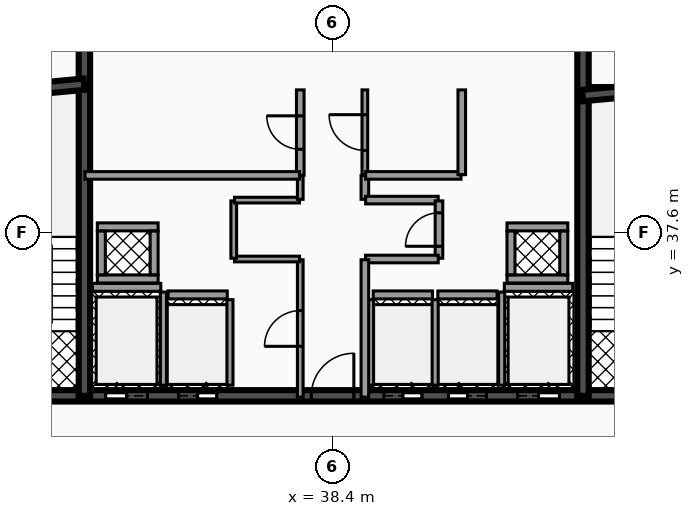
"""IFC4 building model, lengths in metres.
Left out: names, types, materials, properties, quantities, classifications, styles, units other than length and angle.
Written with IfcOpenShell. Run it as: python <this file> out.ifc"""

import sys

from ifc_helpers import new_model, si_unit, direction, frame, frame_2d, origin, place, context, subcontext, project, spatial, rectangle, extrude, element, fill, save


model = new_model("IFC4")
c1 = context("Model", 3, precision=1e-05, world=origin(), true_north=direction((0.0, 1.0)))
c2 = subcontext(c1, "Body", "Model", "MODEL_VIEW")
j1 = project(units=[si_unit("LENGTHUNIT", "METRE"), si_unit("PLANEANGLEUNIT", "RADIAN")], contexts=[c1])
p1 = place(None, origin())
s1 = spatial("IfcSite", under=j1, at=p1, CompositionType="ELEMENT")
p2 = place(p1, origin())
s2 = spatial("IfcBuilding", under=s1, at=p2, CompositionType="ELEMENT")
p3 = place(p2, frame((0.0, 0.0, 261.8)))
s3 = spatial("IfcBuildingStorey", under=s2, at=p3, CompositionType="ELEMENT", Elevation=261.8)
p4 = place(p3, frame((28.5, 33.3, 0.0), z_axis=(0.0, 0.0, 1.0), x_axis=(1.0, 0.0, 0.0)))
e1 = element("IfcWall", 1, at=p4, inside=s3, PredefinedType="SHEAR", context=c2, shape_type="SweptSolid", body=[
    extrude(rectangle(XDim=19.86, YDim=0.3, at=frame_2d((9.93, 0.0))), origin(), (0.0, 0.0, 1.0), 3.18),
])
p5 = place(p4, frame((3.93, 0.0, 0.0)))
e2 = element("IfcOpeningElement", 2, at=p5, cuts=e1, PredefinedType="OPENING", context=c2, shape_type="SweptSolid", body=[
    extrude(rectangle(XDim=1.1, YDim=2.15, at=frame_2d((0.55, 1.075))), frame((0.0, 0.16, 0.0), z_axis=(0.0, -1.0, 0.0), x_axis=(1.0, 0.0, 0.0)), (0.0, 0.0, 1.0), 0.32),
])
p6 = place(p4, frame((14.77, 0.0, 0.0)))
e3 = element("IfcOpeningElement", 3, at=p6, cuts=e1, PredefinedType="OPENING", context=c2, shape_type="SweptSolid", body=[
    extrude(rectangle(XDim=1.1, YDim=2.15, at=frame_2d((0.55, 1.075))), frame((0.0, 0.16, 0.0), z_axis=(0.0, -1.0, 0.0), x_axis=(1.0, 0.0, 0.0)), (0.0, 0.0, 1.0), 0.32),
])
p7 = place(p4, frame((11.25, 0.0, 0.0)))
e4 = element("IfcOpeningElement", 4, at=p7, cuts=e1, PredefinedType="OPENING", context=c2, shape_type="SweptSolid", body=[
    extrude(rectangle(XDim=1.0, YDim=2.1, at=frame_2d((0.5, 1.05))), frame((0.0, 0.16, 0.0), z_axis=(0.0, -1.0, 0.0), x_axis=(1.0, 0.0, 0.0)), (0.0, 0.0, 1.0), 0.32),
])
p8 = place(p4, frame((12.95, 0.0, 0.0)))
e5 = element("IfcOpeningElement", 5, at=p8, cuts=e1, PredefinedType="OPENING", context=c2, shape_type="SweptSolid", body=[
    extrude(rectangle(XDim=1.0, YDim=2.1, at=frame_2d((0.5, 1.05))), frame((0.0, 0.16, 0.0), z_axis=(0.0, -1.0, 0.0), x_axis=(1.0, 0.0, 0.0)), (0.0, 0.0, 1.0), 0.32),
])
p9 = place(p4, frame((5.85, 0.0, 0.0)))
e6 = element("IfcOpeningElement", 6, at=p9, cuts=e1, PredefinedType="OPENING", context=c2, shape_type="SweptSolid", body=[
    extrude(rectangle(XDim=1.0, YDim=2.1, at=frame_2d((0.5, 1.05))), frame((0.0, 0.16, 0.0), z_axis=(0.0, -1.0, 0.0), x_axis=(1.0, 0.0, 0.0)), (0.0, 0.0, 1.0), 0.32),
])
p10 = place(p4, frame((1.21, 0.0, 0.0)))
e7 = element("IfcOpeningElement", 7, at=p10, cuts=e1, PredefinedType="OPENING", context=c2, shape_type="SweptSolid", body=[
    extrude(rectangle(XDim=1.1, YDim=2.2, at=frame_2d((0.55, 1.1))), frame((0.0, 0.16, 0.0), z_axis=(0.0, -1.0, 0.0), x_axis=(1.0, 0.0, 0.0)), (0.0, 0.0, 1.0), 0.32),
])
p11 = place(p4, frame((9.34, 0.0, 0.0)))
e8 = element("IfcOpeningElement", 8, at=p11, cuts=e1, PredefinedType="OPENING", context=c2, shape_type="SweptSolid", body=[
    extrude(rectangle(XDim=1.12, YDim=2.05, at=frame_2d((0.56, 1.025))), frame((0.0, 0.16, 0.0), z_axis=(0.0, -1.0, 0.0), x_axis=(1.0, 0.0, 0.0)), (0.0, 0.0, 1.0), 0.32),
])
p12 = place(p4, frame((17.55, 0.0, 0.0)))
e9 = element("IfcOpeningElement", 9, at=p12, cuts=e1, PredefinedType="OPENING", context=c2, shape_type="SweptSolid", body=[
    extrude(rectangle(XDim=1.1, YDim=2.2, at=frame_2d((0.55, 1.1))), frame((0.0, 0.16, 0.0), z_axis=(0.0, -1.0, 0.0), x_axis=(1.0, 0.0, 0.0)), (0.0, 0.0, 1.0), 0.32),
])
for number, where, z_axis, x_axis in (
    (10, (31.87, 33.3, 0.0), (0.0, 0.0, 1.0), (0.0, 1.0, 0.0)),
    (11, (44.99, 33.3, 0.0), (0.0, 0.0, 1.0), (0.0, 1.0, 0.0)),
):
    element("IfcWall", number, at=place(p3, frame(where, z_axis=z_axis, x_axis=x_axis)), inside=s3, PredefinedType="SHEAR", context=c2, shape_type="SweptSolid", body=[
        extrude(rectangle(XDim=10.1, YDim=0.3, at=frame_2d((5.05, 0.0))), origin(), (0.0, 0.0, 1.0), 3.18),
    ])
p13 = place(p3, frame((28.64, 41.2, 0.0), z_axis=(0.0, 0.0, 1.0), x_axis=(0.995687118776, 0.092774789157, 0.0)))
e12 = element("IfcWall", 12, at=p13, inside=s3, PredefinedType="SHEAR", context=c2, shape_type="SweptSolid", body=[
    extrude(rectangle(XDim=3.234, YDim=0.3, at=frame_2d((1.617, 0.0))), origin(), (0.0, 0.0, 1.0), 3.18),
])
p14 = place(p3, frame((44.98, 41.2, 0.0), z_axis=(0.0, 0.0, 1.0), x_axis=(0.995686468965, 0.09278176286, 0.0)))
e13 = element("IfcWall", 13, at=p14, inside=s3, PredefinedType="SHEAR", context=c2, shape_type="SweptSolid", body=[
    extrude(rectangle(XDim=3.234, YDim=0.3, at=frame_2d((1.617, 0.0))), origin(), (0.0, 0.0, 1.0), 3.18),
])
p15 = place(p3, frame((32.08, 36.155, 0.0), z_axis=(0.0, 0.0, 1.0), x_axis=(1.0, 0.0, 0.0)))
e14 = element("IfcWall", 14, at=p15, inside=s3, PredefinedType="SOLIDWALL", context=c2, shape_type="SweptSolid", body=[
    extrude(rectangle(XDim=1.8, YDim=0.21, at=frame_2d((0.9, 0.0))), origin(), (0.0, 0.0, 1.0), 3.18),
])
p16 = place(p3, frame((33.95, 33.58, 0.0), z_axis=(0.0, 0.0, 1.0), x_axis=(0.0, 1.0, 0.0)))
e15 = element("IfcWall", 15, at=p16, inside=s3, PredefinedType="SOLIDWALL", context=c2, shape_type="SweptSolid", body=[
    extrude(rectangle(XDim=2.45, YDim=0.16, at=frame_2d((1.225, 0.0))), origin(), (0.0, 0.0, 1.0), 3.18),
])
p17 = place(p3, frame((42.92, 36.155, 0.0), z_axis=(0.0, 0.0, 1.0), x_axis=(1.0, 0.0, 0.0)))
e16 = element("IfcWall", 16, at=p17, inside=s3, PredefinedType="SOLIDWALL", context=c2, shape_type="SweptSolid", body=[
    extrude(rectangle(XDim=1.8, YDim=0.21, at=frame_2d((0.9, 0.0))), origin(), (0.0, 0.0, 1.0), 3.18),
])
p18 = place(p3, frame((42.85, 33.58, 0.0), z_axis=(0.0, 0.0, 1.0), x_axis=(0.0, 1.0, 0.0)))
e17 = element("IfcWall", 17, at=p18, inside=s3, PredefinedType="SOLIDWALL", context=c2, shape_type="SweptSolid", body=[
    extrude(rectangle(XDim=2.45, YDim=0.16, at=frame_2d((1.225, 0.0))), origin(), (0.0, 0.0, 1.0), 3.18),
])
p19 = place(p3, frame((39.47, 35.955, 0.0), z_axis=(0.0, 0.0, 1.0), x_axis=(1.0, 0.0, 0.0)))
e18 = element("IfcWall", 18, at=p19, inside=s3, PredefinedType="SOLIDWALL", context=c2, shape_type="SweptSolid", body=[
    extrude(rectangle(XDim=1.56, YDim=0.21, at=frame_2d((0.78, 0.0))), origin(), (0.0, 0.0, 1.0), 3.18),
])
for number, where, z_axis, x_axis in (
    (19, (39.4, 33.58, 0.0), (0.0, 0.0, 1.0), (0.0, 1.0, 0.0)),
    (20, (41.1, 33.58, 0.0), (0.0, 0.0, 1.0), (0.0, 1.0, 0.0)),
):
    element("IfcWall", number, at=place(p3, frame(where, z_axis=z_axis, x_axis=x_axis)), inside=s3, PredefinedType="SOLIDWALL", context=c2, shape_type="SweptSolid", body=[
        extrude(rectangle(XDim=2.25, YDim=0.16, at=frame_2d((1.125, 0.0))), origin(), (0.0, 0.0, 1.0), 3.18),
    ])
p20 = place(p3, frame((41.17, 35.955, 0.0), z_axis=(0.0, 0.0, 1.0), x_axis=(1.0, 0.0, 0.0)))
e21 = element("IfcWall", 21, at=p20, inside=s3, PredefinedType="SOLIDWALL", context=c2, shape_type="SweptSolid", body=[
    extrude(rectangle(XDim=1.56, YDim=0.21, at=frame_2d((0.78, 0.0))), origin(), (0.0, 0.0, 1.0), 3.18),
])
p21 = place(p3, frame((34.07, 35.955, 0.0), z_axis=(0.0, 0.0, 1.0), x_axis=(1.0, 0.0, 0.0)))
e22 = element("IfcWall", 22, at=p21, inside=s3, PredefinedType="SOLIDWALL", context=c2, shape_type="SweptSolid", body=[
    extrude(rectangle(XDim=1.56, YDim=0.21, at=frame_2d((0.78, 0.0))), origin(), (0.0, 0.0, 1.0), 3.18),
])
p22 = place(p3, frame((35.7, 33.58, 0.0), z_axis=(0.0, 0.0, 1.0), x_axis=(0.0, 1.0, 0.0)))
e23 = element("IfcWall", 23, at=p22, inside=s3, PredefinedType="SOLIDWALL", context=c2, shape_type="SweptSolid", body=[
    extrude(rectangle(XDim=2.25, YDim=0.16, at=frame_2d((1.125, 0.0))), origin(), (0.0, 0.0, 1.0), 3.18),
])
for number, where, z_axis, x_axis in (
    (24, (32.21, 36.375, 0.0), (0.0, 0.0, 1.0), (1.0, 0.0, 0.0)),
    (25, (32.21, 37.745, 0.0), (0.0, 0.0, 1.0), (1.0, 0.0, 0.0)),
):
    element("IfcWall", number, at=place(p3, frame(where, z_axis=z_axis, x_axis=x_axis)), inside=s3, PredefinedType="SOLIDWALL", context=c2, shape_type="SweptSolid", body=[
        extrude(rectangle(XDim=1.6, YDim=0.21, at=frame_2d((0.8, 0.0))), origin(), (0.0, 0.0, 1.0), 3.18),
    ])
for number, where, z_axis, x_axis in (
    (26, (32.315, 36.485, 0.0), (0.0, 0.0, 1.0), (0.0, 1.0, 0.0)),
    (27, (33.705, 36.485, 0.0), (0.0, 0.0, 1.0), (0.0, 1.0, 0.0)),
):
    element("IfcWall", number, at=place(p3, frame(where, z_axis=z_axis, x_axis=x_axis)), inside=s3, PredefinedType="SOLIDWALL", context=c2, shape_type="SweptSolid", body=[
        extrude(rectangle(XDim=1.15, YDim=0.21, at=frame_2d((0.575, 0.0))), origin(), (0.0, 0.0, 1.0), 3.18),
    ])
for number, where, z_axis, x_axis in (
    (28, (42.99, 36.375, 0.0), (0.0, 0.0, 1.0), (1.0, 0.0, 0.0)),
    (29, (42.99, 37.745, 0.0), (0.0, 0.0, 1.0), (1.0, 0.0, 0.0)),
):
    element("IfcWall", number, at=place(p3, frame(where, z_axis=z_axis, x_axis=x_axis)), inside=s3, PredefinedType="SOLIDWALL", context=c2, shape_type="SweptSolid", body=[
        extrude(rectangle(XDim=1.6, YDim=0.21, at=frame_2d((0.8, 0.0))), origin(), (0.0, 0.0, 1.0), 3.18),
    ])
for number, where, z_axis, x_axis in (
    (30, (43.095, 36.485, 0.0), (0.0, 0.0, 1.0), (0.0, 1.0, 0.0)),
    (31, (44.485, 36.485, 0.0), (0.0, 0.0, 1.0), (0.0, 1.0, 0.0)),
):
    element("IfcWall", number, at=place(p3, frame(where, z_axis=z_axis, x_axis=x_axis)), inside=s3, PredefinedType="SOLIDWALL", context=c2, shape_type="SweptSolid", body=[
        extrude(rectangle(XDim=1.15, YDim=0.21, at=frame_2d((0.575, 0.0))), origin(), (0.0, 0.0, 1.0), 3.18),
    ])
p23 = place(p3, frame((37.55, 33.265, 0.0), z_axis=(0.0, 0.0, 1.0), x_axis=(0.0, 1.0, 0.0)))
e32 = element("IfcWall", 32, at=p23, inside=s3, PredefinedType="PARTITIONING", context=c2, shape_type="SweptSolid", body=[
    extrude(rectangle(XDim=3.615, YDim=0.15, at=frame_2d((1.808, 0.0))), origin(), (0.0, 0.0, 1.0), 2.235),
])
p24 = place(p23, frame((1.337, 0.0, 0.0)))
e33 = element("IfcOpeningElement", 33, at=p24, cuts=e32, PredefinedType="OPENING", context=c2, shape_type="SweptSolid", body=[
    extrude(rectangle(XDim=0.94, YDim=2.05, at=frame_2d((0.47, 1.025))), frame((0.0, 0.085, 0.0), z_axis=(0.0, -1.0, 0.0), x_axis=(1.0, 0.0, 0.0)), (0.0, 0.0, 1.0), 0.17),
])
p25 = place(p3, frame((35.82, 36.9, 0.0), z_axis=(0.0, 0.0, 1.0), x_axis=(1.0, 0.0, 0.0)))
e34 = element("IfcWall", 34, at=p25, inside=s3, PredefinedType="PARTITIONING", context=c2, shape_type="SweptSolid", body=[
    extrude(rectangle(XDim=1.71, YDim=0.15, at=frame_2d((0.855, 0.0))), origin(), (0.0, 0.0, 1.0), 2.235),
])
p26 = place(p3, frame((35.8, 36.92, 0.0), z_axis=(0.0, 0.0, 1.0), x_axis=(0.0, 1.0, 0.0)))
e35 = element("IfcWall", 35, at=p26, inside=s3, PredefinedType="PARTITIONING", context=c2, shape_type="SweptSolid", body=[
    extrude(rectangle(XDim=1.51, YDim=0.15, at=frame_2d((0.755, 0.0))), origin(), (0.0, 0.0, 1.0), 2.235),
])
p27 = place(p3, frame((35.82, 38.45, 0.0), z_axis=(0.0, 0.0, 1.0), x_axis=(1.0, 0.0, 0.0)))
e36 = element("IfcWall", 36, at=p27, inside=s3, PredefinedType="PARTITIONING", context=c2, shape_type="SweptSolid", body=[
    extrude(rectangle(XDim=1.71, YDim=0.15, at=frame_2d((0.855, 0.0))), origin(), (0.0, 0.0, 1.0), 2.235),
])
p28 = place(p3, frame((37.55, 38.47, 0.0), z_axis=(0.0, 0.0, 1.0), x_axis=(0.0, 1.0, 0.0)))
e37 = element("IfcWall", 37, at=p28, inside=s3, PredefinedType="PARTITIONING", context=c2, shape_type="SweptSolid", body=[
    extrude(rectangle(XDim=0.625, YDim=0.15, at=frame_2d((0.312, 0.0))), origin(), (0.0, 0.0, 1.0), 2.235),
])
p29 = place(p3, frame((37.55, 39.105, 0.0), z_axis=(0.0, 0.0, 1.0), x_axis=(0.0, 1.0, 0.0)))
e38 = element("IfcWall", 38, at=p29, inside=s3, PredefinedType="PARTITIONING", context=c2, shape_type="SweptSolid", body=[
    extrude(rectangle(XDim=2.245, YDim=0.2, at=frame_2d((1.123, 0.0))), origin(), (0.0, 0.0, 1.0), 2.235),
])
p30 = place(p29, frame((0.683, 0.0, 0.0)))
e39 = element("IfcOpeningElement", 39, at=p30, cuts=e38, PredefinedType="OPENING", context=c2, shape_type="SweptSolid", body=[
    extrude(rectangle(XDim=0.88, YDim=2.05, at=frame_2d((0.44, 1.025))), frame((0.0, 0.11, 0.0), z_axis=(0.0, -1.0, 0.0), x_axis=(1.0, 0.0, 0.0)), (0.0, 0.0, 1.0), 0.22),
])
p31 = place(p3, frame((39.25, 38.47, 0.0), z_axis=(0.0, 0.0, 1.0), x_axis=(0.0, 1.0, 0.0)))
e40 = element("IfcWall", 40, at=p31, inside=s3, PredefinedType="PARTITIONING", context=c2, shape_type="SweptSolid", body=[
    extrude(rectangle(XDim=0.625, YDim=0.2, at=frame_2d((0.312, 0.0))), origin(), (0.0, 0.0, 1.0), 2.235),
])
p32 = place(p3, frame((39.27, 38.45, 0.0), z_axis=(0.0, 0.0, 1.0), x_axis=(1.0, 0.0, 0.0)))
e41 = element("IfcWall", 41, at=p32, inside=s3, PredefinedType="PARTITIONING", context=c2, shape_type="SweptSolid", body=[
    extrude(rectangle(XDim=1.91, YDim=0.2, at=frame_2d((0.955, 0.0))), origin(), (0.0, 0.0, 1.0), 2.235),
])
p33 = place(p3, frame((41.2, 36.92, 0.0), z_axis=(0.0, 0.0, 1.0), x_axis=(0.0, 1.0, 0.0)))
e42 = element("IfcWall", 42, at=p33, inside=s3, PredefinedType="PARTITIONING", context=c2, shape_type="SweptSolid", body=[
    extrude(rectangle(XDim=1.51, YDim=0.2, at=frame_2d((0.755, 0.0))), origin(), (0.0, 0.0, 1.0), 2.235),
])
p34 = place(p33, frame((0.315, 0.0, 0.0)))
e43 = element("IfcOpeningElement", 43, at=p34, cuts=e42, PredefinedType="OPENING", context=c2, shape_type="SweptSolid", body=[
    extrude(rectangle(XDim=0.88, YDim=2.05, at=frame_2d((0.44, 1.025))), frame((0.0, 0.11, 0.0), z_axis=(0.0, -1.0, 0.0), x_axis=(1.0, 0.0, 0.0)), (0.0, 0.0, 1.0), 0.22),
])
p35 = place(p3, frame((39.27, 36.9, 0.0), z_axis=(0.0, 0.0, 1.0), x_axis=(1.0, 0.0, 0.0)))
e44 = element("IfcWall", 44, at=p35, inside=s3, PredefinedType="PARTITIONING", context=c2, shape_type="SweptSolid", body=[
    extrude(rectangle(XDim=1.91, YDim=0.2, at=frame_2d((0.955, 0.0))), origin(), (0.0, 0.0, 1.0), 2.235),
])
p36 = place(p3, frame((39.25, 33.265, 0.0), z_axis=(0.0, 0.0, 1.0), x_axis=(0.0, 1.0, 0.0)))
e45 = element("IfcWall", 45, at=p36, inside=s3, PredefinedType="PARTITIONING", context=c2, shape_type="SweptSolid", body=[
    extrude(rectangle(XDim=3.615, YDim=0.2, at=frame_2d((1.808, 0.0))), origin(), (0.0, 0.0, 1.0), 2.235),
])
p37 = place(p3, frame((39.25, 39.105, 0.0), z_axis=(0.0, 0.0, 1.0), x_axis=(0.0, 1.0, 0.0)))
e46 = element("IfcWall", 46, at=p37, inside=s3, PredefinedType="PARTITIONING", context=c2, shape_type="SweptSolid", body=[
    extrude(rectangle(XDim=2.245, YDim=0.15, at=frame_2d((1.123, 0.0))), origin(), (0.0, 0.0, 1.0), 2.235),
])
p38 = place(p37, frame((0.653, 0.0, 0.0)))
e47 = element("IfcOpeningElement", 47, at=p38, cuts=e46, PredefinedType="OPENING", context=c2, shape_type="SweptSolid", body=[
    extrude(rectangle(XDim=0.94, YDim=2.05, at=frame_2d((0.47, 1.025))), frame((0.0, 0.085, 0.0), z_axis=(0.0, -1.0, 0.0), x_axis=(1.0, 0.0, 0.0)), (0.0, 0.0, 1.0), 0.17),
])
p39 = place(p3, frame((31.885, 39.1, 0.0), z_axis=(0.0, 0.0, 1.0), x_axis=(1.0, 0.0, 0.0)))
e48 = element("IfcWall", 48, at=p39, inside=s3, PredefinedType="PARTITIONING", context=c2, shape_type="SweptSolid", body=[
    extrude(rectangle(XDim=5.645, YDim=0.2, at=frame_2d((2.823, 0.0))), origin(), (0.0, 0.0, 1.0), 2.235),
])
p40 = place(p3, frame((39.27, 39.1, 0.0), z_axis=(0.0, 0.0, 1.0), x_axis=(1.0, 0.0, 0.0)))
e49 = element("IfcWall", 49, at=p40, inside=s3, PredefinedType="PARTITIONING", context=c2, shape_type="SweptSolid", body=[
    extrude(rectangle(XDim=2.51, YDim=0.2, at=frame_2d((1.255, 0.0))), origin(), (0.0, 0.0, 1.0), 2.235),
])
p41 = place(p3, frame((41.8, 39.12, 0.0), z_axis=(0.0, 0.0, 1.0), x_axis=(0.0, 1.0, 0.0)))
e50 = element("IfcWall", 50, at=p41, inside=s3, PredefinedType="PARTITIONING", context=c2, shape_type="SweptSolid", body=[
    extrude(rectangle(XDim=2.23, YDim=0.2, at=frame_2d((1.115, 0.0))), origin(), (0.0, 0.0, 1.0), 2.235),
])
p42 = place(p5, origin())
e51 = element("IfcDoor", 51, at=p42, inside=s3, OperationType="SLIDING_TO_LEFT", PredefinedType="DOOR", context=c2, shape_type="SweptSolid", body=[
    extrude(rectangle(XDim=1.1, YDim=2.15, at=frame_2d((0.55, 1.075))), frame((0.0, 0.025, 0.0), z_axis=(0.0, -1.0, 0.0), x_axis=(1.0, 0.0, 0.0)), (0.0, 0.0, 1.0), 0.05),
])
fill(e2, e51)
p43 = place(p6, origin())
e52 = element("IfcDoor", 52, at=p43, inside=s3, OperationType="SLIDING_TO_RIGHT", PredefinedType="DOOR", context=c2, shape_type="SweptSolid", body=[
    extrude(rectangle(XDim=1.1, YDim=2.15, at=frame_2d((0.55, 1.075))), frame((0.0, 0.025, 0.0), z_axis=(0.0, -1.0, 0.0), x_axis=(1.0, 0.0, 0.0)), (0.0, 0.0, 1.0), 0.05),
])
fill(e3, e52)
p44 = place(p7, origin())
e53 = element("IfcDoor", 53, at=p44, inside=s3, OperationType="SLIDING_TO_RIGHT", PredefinedType="DOOR", context=c2, shape_type="SweptSolid", body=[
    extrude(rectangle(XDim=1.0, YDim=2.1, at=frame_2d((0.5, 1.05))), frame((0.0, 0.025, 0.0), z_axis=(0.0, -1.0, 0.0), x_axis=(1.0, 0.0, 0.0)), (0.0, 0.0, 1.0), 0.05),
])
fill(e4, e53)
p45 = place(p8, origin())
e54 = element("IfcDoor", 54, at=p45, inside=s3, OperationType="SLIDING_TO_LEFT", PredefinedType="DOOR", context=c2, shape_type="SweptSolid", body=[
    extrude(rectangle(XDim=1.0, YDim=2.1, at=frame_2d((0.5, 1.05))), frame((0.0, 0.025, 0.0), z_axis=(0.0, -1.0, 0.0), x_axis=(1.0, 0.0, 0.0)), (0.0, 0.0, 1.0), 0.05),
])
fill(e5, e54)
p46 = place(p9, origin())
e55 = element("IfcDoor", 55, at=p46, inside=s3, OperationType="SLIDING_TO_RIGHT", PredefinedType="DOOR", context=c2, shape_type="SweptSolid", body=[
    extrude(rectangle(XDim=1.0, YDim=2.1, at=frame_2d((0.5, 1.05))), frame((0.0, 0.025, 0.0), z_axis=(0.0, -1.0, 0.0), x_axis=(1.0, 0.0, 0.0)), (0.0, 0.0, 1.0), 0.05),
])
fill(e6, e55)
p47 = place(p11, origin())
e56 = element("IfcDoor", 56, at=p47, inside=s3, OperationType="SINGLE_SWING_RIGHT", PredefinedType="DOOR", context=c2, shape_type="SweptSolid", body=[
    extrude(rectangle(XDim=1.12, YDim=2.05, at=frame_2d((0.56, 1.025))), frame((0.0, 0.025, 0.0), z_axis=(0.0, -1.0, 0.0), x_axis=(1.0, 0.0, 0.0)), (0.0, 0.0, 1.0), 0.05),
])
fill(e8, e56)
p48 = place(p24, origin())
e57 = element("IfcDoor", 57, at=p48, inside=s3, OperationType="SINGLE_SWING_LEFT", PredefinedType="DOOR", context=c2, shape_type="SweptSolid", body=[
    extrude(rectangle(XDim=0.94, YDim=2.05, at=frame_2d((0.47, 1.025))), frame((0.0, 0.025, 0.0), z_axis=(0.0, -1.0, 0.0), x_axis=(1.0, 0.0, 0.0)), (0.0, 0.0, 1.0), 0.05),
])
fill(e33, e57)
p49 = place(p30, origin())
e58 = element("IfcDoor", 58, at=p49, inside=s3, OperationType="SINGLE_SWING_RIGHT", PredefinedType="DOOR", context=c2, shape_type="SweptSolid", body=[
    extrude(rectangle(XDim=0.88, YDim=2.05, at=frame_2d((0.44, 1.025))), frame((0.0, 0.025, 0.0), z_axis=(0.0, -1.0, 0.0), x_axis=(1.0, 0.0, 0.0)), (0.0, 0.0, 1.0), 0.05),
])
fill(e39, e58)
p50 = place(p34, origin())
e59 = element("IfcDoor", 59, at=p50, inside=s3, OperationType="SINGLE_SWING_LEFT", PredefinedType="DOOR", context=c2, shape_type="SweptSolid", body=[
    extrude(rectangle(XDim=0.88, YDim=2.05, at=frame_2d((0.44, 1.025))), frame((0.0, 0.025, 0.0), z_axis=(0.0, -1.0, 0.0), x_axis=(1.0, 0.0, 0.0)), (0.0, 0.0, 1.0), 0.05),
])
fill(e43, e59)
p51 = place(p38, origin())
e60 = element("IfcDoor", 60, at=p51, inside=s3, OperationType="SINGLE_SWING_RIGHT", PredefinedType="DOOR", context=c2, shape_type="SweptSolid", body=[
    extrude(rectangle(XDim=0.94, YDim=2.05, at=frame_2d((0.47, 1.025))), frame((0.0, 0.025, 0.0), z_axis=(0.0, -1.0, 0.0), x_axis=(1.0, 0.0, 0.0)), (0.0, 0.0, 1.0), 0.05),
])
fill(e47, e60)
save(model, sys.argv[1])
